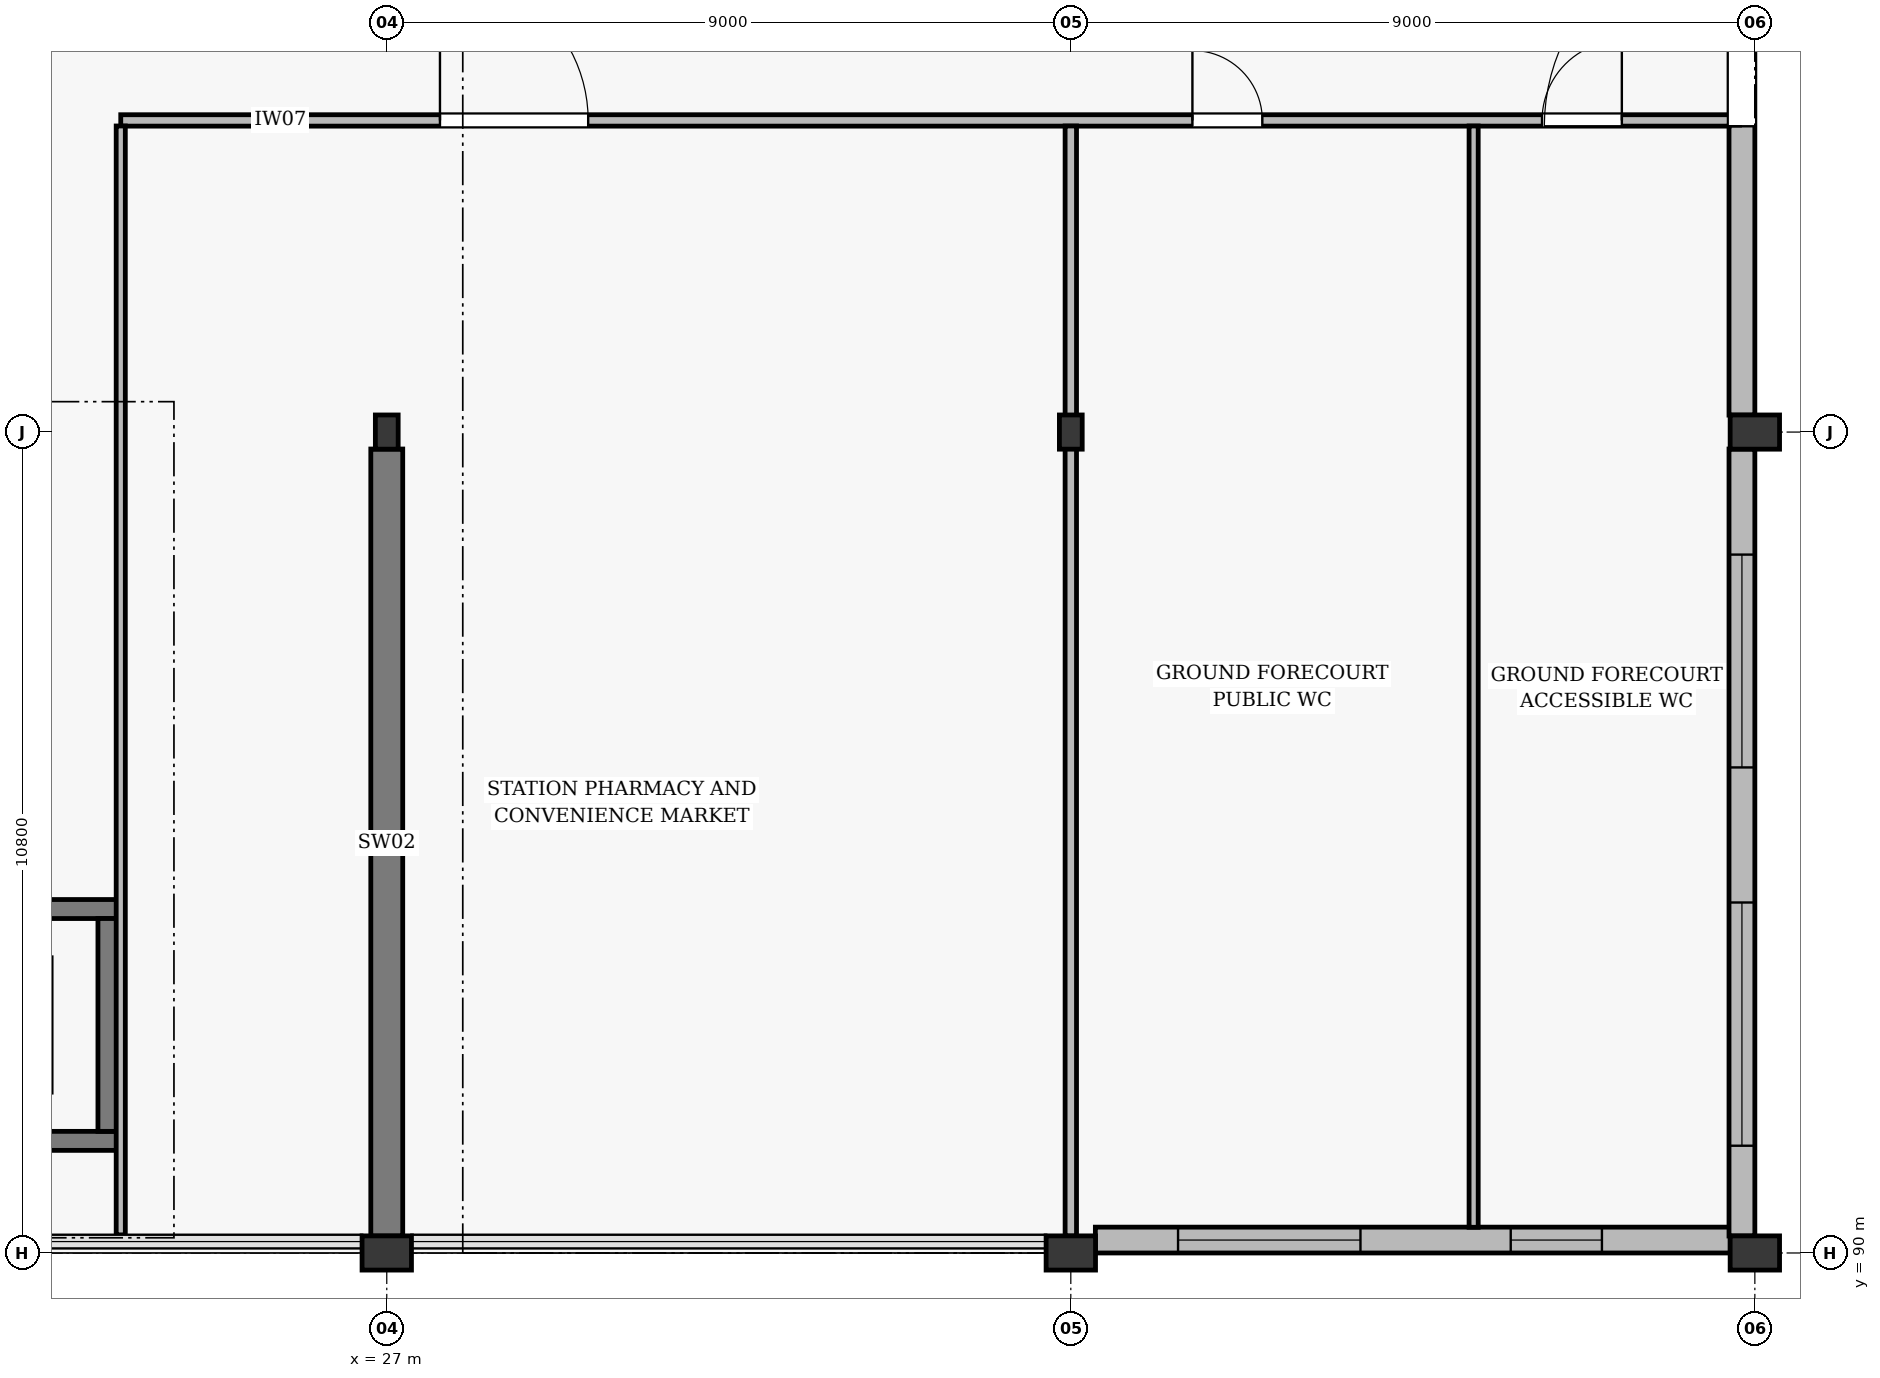
"""IFC4 building model, lengths in metres.
Left out: names, types, materials, properties, quantities, classifications, styles, units other than length and angle.
Written with IfcOpenShell. Run it as: python <this file> out.ifc"""

import sys

from ifc_helpers import new_model, si_unit, direction, frame, frame_2d, origin, origin_2d, place, context, subcontext, project, spatial, rectangle, i_section, extrude, element, fill, save


model = new_model("IFC4")
c1 = context("Model", 3, precision=1e-05, world=origin(), true_north=direction((0.0, 1.0)))
c2 = subcontext(c1, "Body", "Model", "MODEL_VIEW")
j1 = project(units=[si_unit("LENGTHUNIT", "METRE"), si_unit("PLANEANGLEUNIT", "RADIAN")], contexts=[c1])
p1 = place(None, origin())
s1 = spatial("IfcSite", under=j1, at=p1, CompositionType="ELEMENT")
p2 = place(p1, origin())
s2 = spatial("IfcBuilding", under=s1, at=p2, CompositionType="ELEMENT")
p3 = place(p2, origin())
s3 = spatial("IfcBuildingStorey", under=s2, at=p3, CompositionType="ELEMENT", Elevation=0.0)
p4 = place(p3, frame((27.0, 90.0, 0.0), z_axis=(0.0, 0.0, 1.0), x_axis=(1.0, 0.0, 0.0)))
e1 = element("IfcColumn", 1, at=p4, inside=s3, PredefinedType="PILASTER", context=c2, shape_type="SweptSolid", body=[
    extrude(rectangle(XDim=0.65, YDim=0.45, at=origin_2d()), origin(), (0.0, 0.0, 1.0), 6.6),
])
p5 = place(p3, frame((27.0, 100.8, 0.0), z_axis=(0.0, 0.0, 1.0), x_axis=(1.0, 0.0, 0.0)))
e2 = element("IfcColumn", 2, at=p5, inside=s3, PredefinedType="COLUMN", context=c2, shape_type="SweptSolid", body=[
    extrude(i_section(OverallWidth=0.3, OverallDepth=0.45, WebThickness=0.014, FlangeThickness=0.026, at=origin_2d()), origin(), (0.0, 0.0, 1.0), 6.6),
])
p6 = place(p3, frame((36.0, 90.0, 0.0), z_axis=(0.0, 0.0, 1.0), x_axis=(1.0, 0.0, 0.0)))
e3 = element("IfcColumn", 3, at=p6, inside=s3, PredefinedType="PILASTER", context=c2, shape_type="SweptSolid", body=[
    extrude(rectangle(XDim=0.65, YDim=0.45, at=origin_2d()), origin(), (0.0, 0.0, 1.0), 6.6),
])
p7 = place(p3, frame((36.0, 100.8, 0.0), z_axis=(0.0, 0.0, 1.0), x_axis=(1.0, 0.0, 0.0)))
e4 = element("IfcColumn", 4, at=p7, inside=s3, PredefinedType="COLUMN", context=c2, shape_type="SweptSolid", body=[
    extrude(i_section(OverallWidth=0.3, OverallDepth=0.45, WebThickness=0.014, FlangeThickness=0.026, at=origin_2d()), origin(), (0.0, 0.0, 1.0), 6.6),
])
for number, where, z_axis, x_axis in (
    (5, (45.0, 90.0, 0.0), (0.0, 0.0, 1.0), (1.0, 0.0, 0.0)),
    (6, (45.0, 100.8, 0.0), (0.0, 0.0, 1.0), (1.0, 0.0, 0.0)),
):
    element("IfcColumn", number, at=place(p3, frame(where, z_axis=z_axis, x_axis=x_axis)), inside=s3, PredefinedType="PILASTER", context=c2, shape_type="SweptSolid", body=[
        extrude(rectangle(XDim=0.65, YDim=0.45, at=origin_2d()), origin(), (0.0, 0.0, 1.0), 6.6),
    ])
p8 = place(p3, frame((27.0, 90.223, 0.0), z_axis=(0.0, 0.0, 1.0), x_axis=(0.0, 1.0, 0.0)))
e7 = element("IfcWall", 7, at=p8, inside=s3, PredefinedType="SHEAR", context=c2, shape_type="SweptSolid", body=[
    extrude(rectangle(XDim=10.354, YDim=0.42, at=frame_2d((5.177, 0.0))), origin(), (0.0, 0.0, 1.0), 6.35),
])
p9 = place(p3, frame((36.323, 90.17, 0.0), z_axis=(0.0, 0.0, 1.0), x_axis=(1.0, 0.0, 0.0)))
e8 = element("IfcWall", 8, at=p9, inside=s3, PredefinedType="STANDARD", context=c2, shape_type="SweptSolid", body=[
    extrude(rectangle(XDim=8.354, YDim=0.34, at=frame_2d((4.177, 0.0))), origin(), (0.0, 0.0, 1.0), 5.85),
])
p10 = place(p9, frame((1.088, 0.0, 1.05)))
e9 = element("IfcOpeningElement", 9, at=p10, cuts=e8, PredefinedType="OPENING", context=c2, shape_type="SweptSolid", body=[
    extrude(rectangle(XDim=2.4, YDim=1.2, at=frame_2d((1.2, 0.6))), frame((0.0, 0.182, 0.0), z_axis=(0.0, -1.0, 0.0), x_axis=(1.0, 0.0, 0.0)), (0.0, 0.0, 1.0), 0.364),
])
p11 = place(p9, frame((5.465, 0.0, 1.05)))
e10 = element("IfcOpeningElement", 10, at=p11, cuts=e8, PredefinedType="OPENING", context=c2, shape_type="SweptSolid", body=[
    extrude(rectangle(XDim=1.2, YDim=0.9, at=frame_2d((0.6, 0.45))), frame((0.0, 0.182, 0.0), z_axis=(0.0, -1.0, 0.0), x_axis=(1.0, 0.0, 0.0)), (0.0, 0.0, 1.0), 0.364),
])
p12 = place(p3, frame((44.83, 90.223, 0.0), z_axis=(0.0, 0.0, 1.0), x_axis=(0.0, 1.0, 0.0)))
e11 = element("IfcWall", 11, at=p12, inside=s3, PredefinedType="STANDARD", context=c2, shape_type="SweptSolid", body=[
    extrude(rectangle(XDim=10.354, YDim=0.34, at=frame_2d((5.177, 0.0))), origin(), (0.0, 0.0, 1.0), 5.85),
])
p13 = place(p12, frame((1.188, 0.0, 0.75)))
e12 = element("IfcOpeningElement", 12, at=p13, cuts=e11, PredefinedType="OPENING", context=c2, shape_type="SweptSolid", body=[
    extrude(rectangle(XDim=3.2, YDim=2.8, at=frame_2d((1.6, 1.4))), frame((0.0, 0.182, 0.0), z_axis=(0.0, -1.0, 0.0), x_axis=(1.0, 0.0, 0.0)), (0.0, 0.0, 1.0), 0.364),
])
p14 = place(p12, frame((6.165, 0.0, 0.75)))
e13 = element("IfcOpeningElement", 13, at=p14, cuts=e11, PredefinedType="OPENING", context=c2, shape_type="SweptSolid", body=[
    extrude(rectangle(XDim=2.8, YDim=2.6, at=frame_2d((1.4, 1.3))), frame((0.0, 0.182, 0.0), z_axis=(0.0, -1.0, 0.0), x_axis=(1.0, 0.0, 0.0)), (0.0, 0.0, 1.0), 0.364),
])
p15 = place(p3, frame((44.83, 101.023, 0.0), z_axis=(0.0, 0.0, 1.0), x_axis=(0.0, 1.0, 0.0)))
e14 = element("IfcWall", 14, at=p15, inside=s3, PredefinedType="STANDARD", context=c2, shape_type="SweptSolid", body=[
    extrude(rectangle(XDim=10.354, YDim=0.34, at=frame_2d((5.177, 0.0))), origin(), (0.0, 0.0, 1.0), 5.85),
])
p16 = place(p15, frame((3.8, 0.0, 0.005)))
e15 = element("IfcOpeningElement", 15, at=p16, cuts=e14, PredefinedType="OPENING", context=c2, shape_type="SweptSolid", body=[
    extrude(rectangle(XDim=2.6, YDim=2.6, at=frame_2d((1.3, 1.3))), frame((0.0, 0.182, 0.0), z_axis=(0.0, -1.0, 0.0), x_axis=(1.0, 0.0, 0.0)), (0.0, 0.0, 1.0), 0.364),
])
p17 = place(p3, frame((20.15, 91.475, 0.0), z_axis=(0.0, 0.0, 1.0), x_axis=(1.0, 0.0, 0.0)))
e16 = element("IfcWall", 16, at=p17, inside=s3, PredefinedType="SOLIDWALL", context=c2, shape_type="SweptSolid", body=[
    extrude(rectangle(XDim=3.3, YDim=0.25, at=frame_2d((1.65, 0.0))), origin(), (0.0, 0.0, 1.0), 6.6),
])
p18 = place(p3, frame((20.15, 94.525, 0.0), z_axis=(0.0, 0.0, 1.0), x_axis=(1.0, 0.0, 0.0)))
e17 = element("IfcWall", 17, at=p18, inside=s3, PredefinedType="SOLIDWALL", context=c2, shape_type="SweptSolid", body=[
    extrude(rectangle(XDim=3.3, YDim=0.25, at=frame_2d((1.65, 0.0))), origin(), (0.0, 0.0, 1.0), 6.6),
])
p19 = place(p18, frame((0.95, 0.0, 0.005)))
e18 = element("IfcOpeningElement", 18, at=p19, cuts=e17, PredefinedType="OPENING", context=c2, shape_type="SweptSolid", body=[
    extrude(rectangle(XDim=1.4, YDim=2.25, at=frame_2d((0.7, 1.125))), frame((0.0, 0.137, 0.0), z_axis=(0.0, -1.0, 0.0), x_axis=(1.0, 0.0, 0.0)), (0.0, 0.0, 1.0), 0.274),
])
p20 = place(p3, frame((23.325, 91.6, 0.0), z_axis=(0.0, 0.0, 1.0), x_axis=(0.0, 1.0, 0.0)))
e19 = element("IfcWall", 19, at=p20, inside=s3, PredefinedType="SOLIDWALL", context=c2, shape_type="SweptSolid", body=[
    extrude(rectangle(XDim=2.8, YDim=0.25, at=frame_2d((1.4, 0.0))), origin(), (0.0, 0.0, 1.0), 6.6),
])
p21 = place(p3, frame((23.5, 104.9, 0.0), z_axis=(0.0, 0.0, 1.0), x_axis=(1.0, 0.0, 0.0)))
e20 = element("IfcWall", 20, at=p21, inside=s3, PredefinedType="PARTITIONING", context=c2, shape_type="SweptSolid", body=[
    extrude(rectangle(XDim=21.162, YDim=0.15, at=frame_2d((10.581, 0.0))), origin(), (0.0, 0.0, 1.0), 5.89),
])
p22 = place(p21, frame((4.2, 0.0, 0.005)))
e21 = element("IfcOpeningElement", 21, at=p22, cuts=e20, PredefinedType="OPENING", context=c2, shape_type="SweptSolid", body=[
    extrude(rectangle(XDim=1.95, YDim=2.3, at=frame_2d((0.975, 1.15))), frame((0.0, 0.087, 0.0), z_axis=(0.0, -1.0, 0.0), x_axis=(1.0, 0.0, 0.0)), (0.0, 0.0, 1.0), 0.174),
])
p23 = place(p21, frame((14.1, 0.0, 0.005)))
e22 = element("IfcOpeningElement", 22, at=p23, cuts=e20, PredefinedType="OPENING", context=c2, shape_type="SweptSolid", body=[
    extrude(rectangle(XDim=0.92, YDim=2.12, at=frame_2d((0.46, 1.06))), frame((0.0, 0.087, 0.0), z_axis=(0.0, -1.0, 0.0), x_axis=(1.0, 0.0, 0.0)), (0.0, 0.0, 1.0), 0.174),
])
p24 = place(p21, frame((18.7, 0.0, 0.005)))
e23 = element("IfcOpeningElement", 23, at=p24, cuts=e20, PredefinedType="OPENING", context=c2, shape_type="SweptSolid", body=[
    extrude(rectangle(XDim=1.05, YDim=2.15, at=frame_2d((0.525, 1.075))), frame((0.0, 0.087, 0.0), z_axis=(0.0, -1.0, 0.0), x_axis=(1.0, 0.0, 0.0)), (0.0, 0.0, 1.0), 0.174),
])
p25 = place(p3, frame((23.5, 90.238, 0.0), z_axis=(0.0, 0.0, 1.0), x_axis=(0.0, 1.0, 0.0)))
e24 = element("IfcWall", 24, at=p25, inside=s3, PredefinedType="PARTITIONING", context=c2, shape_type="SweptSolid", body=[
    extrude(rectangle(XDim=14.589, YDim=0.12, at=frame_2d((7.294, 0.0))), origin(), (0.0, 0.0, 1.0), 5.84),
])
p26 = place(p3, frame((36.0, 90.223, 0.0), z_axis=(0.0, 0.0, 1.0), x_axis=(0.0, 1.0, 0.0)))
e25 = element("IfcWall", 25, at=p26, inside=s3, PredefinedType="PARTITIONING", context=c2, shape_type="SweptSolid", body=[
    extrude(rectangle(XDim=14.604, YDim=0.15, at=frame_2d((7.302, 0.0))), origin(), (0.0, 0.0, 1.0), 5.84),
])
p27 = place(p3, frame((41.3, 90.338, 0.0), z_axis=(0.0, 0.0, 1.0), x_axis=(0.0, 1.0, 0.0)))
e26 = element("IfcWall", 26, at=p27, inside=s3, PredefinedType="PARTITIONING", context=c2, shape_type="SweptSolid", body=[
    extrude(rectangle(XDim=14.489, YDim=0.12, at=frame_2d((7.245, 0.0))), origin(), (0.0, 0.0, 1.0), 5.84),
])
p28 = place(p10, origin())
e27 = element("IfcWindow", 27, at=p28, inside=s3, PartitioningType="DOUBLE_PANEL_VERTICAL", PredefinedType="WINDOW", context=c2, shape_type="SweptSolid", body=[
    extrude(rectangle(XDim=2.4, YDim=1.2, at=frame_2d((1.2, 0.6))), frame((0.0, 0.03, 0.0), z_axis=(0.0, -1.0, 0.0), x_axis=(1.0, 0.0, 0.0)), (0.0, 0.0, 1.0), 0.06),
])
fill(e9, e27)
p29 = place(p11, origin())
e28 = element("IfcWindow", 28, at=p29, inside=s3, PartitioningType="DOUBLE_PANEL_VERTICAL", PredefinedType="WINDOW", context=c2, shape_type="SweptSolid", body=[
    extrude(rectangle(XDim=1.2, YDim=0.9, at=frame_2d((0.6, 0.45))), frame((0.0, 0.03, 0.0), z_axis=(0.0, -1.0, 0.0), x_axis=(1.0, 0.0, 0.0)), (0.0, 0.0, 1.0), 0.06),
])
fill(e10, e28)
p30 = place(p13, origin())
e29 = element("IfcWindow", 29, at=p30, inside=s3, PartitioningType="DOUBLE_PANEL_VERTICAL", PredefinedType="WINDOW", context=c2, shape_type="SweptSolid", body=[
    extrude(rectangle(XDim=3.2, YDim=2.8, at=frame_2d((1.6, 1.4))), frame((0.0, 0.03, 0.0), z_axis=(0.0, -1.0, 0.0), x_axis=(1.0, 0.0, 0.0)), (0.0, 0.0, 1.0), 0.06),
])
fill(e12, e29)
p31 = place(p14, origin())
e30 = element("IfcWindow", 30, at=p31, inside=s3, PartitioningType="DOUBLE_PANEL_VERTICAL", PredefinedType="WINDOW", context=c2, shape_type="SweptSolid", body=[
    extrude(rectangle(XDim=2.8, YDim=2.6, at=frame_2d((1.4, 1.3))), frame((0.0, 0.03, 0.0), z_axis=(0.0, -1.0, 0.0), x_axis=(1.0, 0.0, 0.0)), (0.0, 0.0, 1.0), 0.06),
])
fill(e13, e30)
p32 = place(p16, origin())
e31 = element("IfcDoor", 31, at=p32, inside=s3, OperationType="DOUBLE_DOOR_SINGLE_SWING", PredefinedType="DOOR", context=c2, shape_type="SweptSolid", body=[
    extrude(rectangle(XDim=2.6, YDim=2.6, at=frame_2d((1.3, 1.3))), frame((0.0, 0.025, 0.0), z_axis=(0.0, -1.0, 0.0), x_axis=(1.0, 0.0, 0.0)), (0.0, 0.0, 1.0), 0.05),
])
fill(e15, e31)
p33 = place(p22, origin())
e32 = element("IfcDoor", 32, at=p33, inside=s3, OperationType="DOUBLE_DOOR_SINGLE_SWING", PredefinedType="DOOR", context=c2, shape_type="SweptSolid", body=[
    extrude(rectangle(XDim=1.95, YDim=2.3, at=frame_2d((0.975, 1.15))), frame((0.0, 0.025, 0.0), z_axis=(0.0, -1.0, 0.0), x_axis=(1.0, 0.0, 0.0)), (0.0, 0.0, 1.0), 0.05),
])
fill(e21, e32)
p34 = place(p23, origin())
e33 = element("IfcDoor", 33, at=p34, inside=s3, OperationType="SINGLE_SWING_LEFT", PredefinedType="DOOR", context=c2, shape_type="SweptSolid", body=[
    extrude(rectangle(XDim=0.92, YDim=2.12, at=frame_2d((0.46, 1.06))), frame((0.0, 0.025, 0.0), z_axis=(0.0, -1.0, 0.0), x_axis=(1.0, 0.0, 0.0)), (0.0, 0.0, 1.0), 0.05),
])
fill(e22, e33)
p35 = place(p24, origin())
e34 = element("IfcDoor", 34, at=p35, inside=s3, OperationType="SINGLE_SWING_RIGHT", PredefinedType="DOOR", context=c2, shape_type="SweptSolid", body=[
    extrude(rectangle(XDim=1.05, YDim=2.15, at=frame_2d((0.525, 1.075))), frame((0.0, 0.025, 0.0), z_axis=(0.0, -1.0, 0.0), x_axis=(1.0, 0.0, 0.0)), (0.0, 0.0, 1.0), 0.05),
])
fill(e23, e34)
save(model, sys.argv[1])
